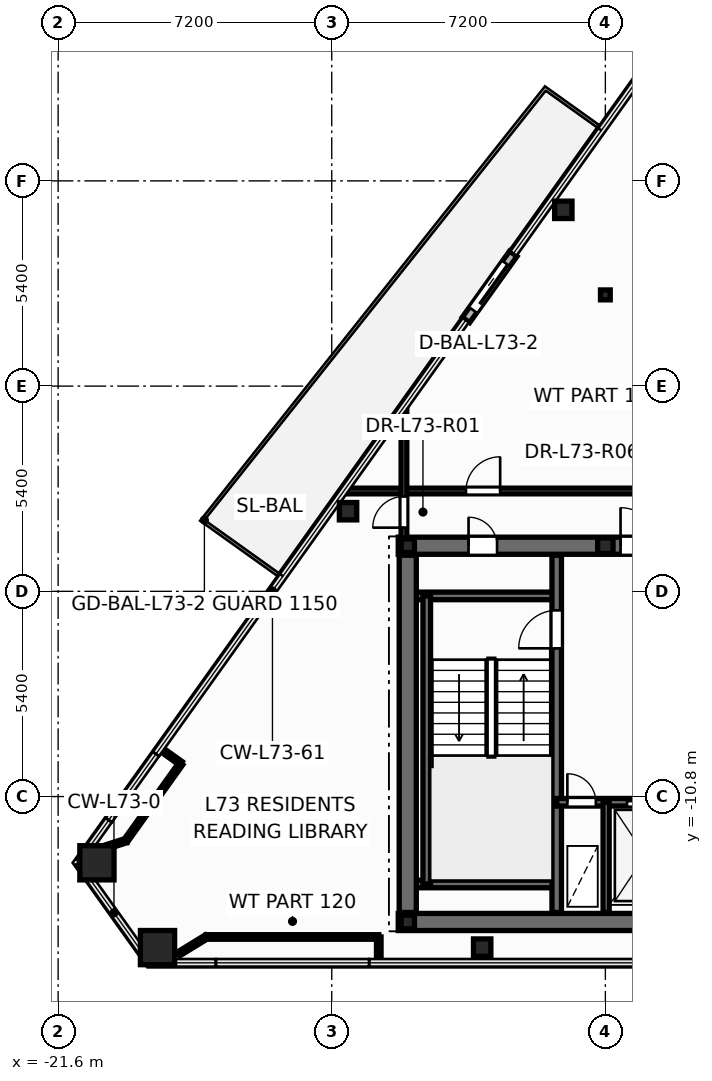
"""IFC4 building model, lengths in metres.
Left out: names, types, materials, properties, quantities, classifications, styles, units other than length and angle.
Written with IfcOpenShell. Run it as: python <this file> out.ifc"""

import sys

from ifc_helpers import new_model, si_unit, direction, frame, frame_2d, origin, origin_2d, place, context, subcontext, project, spatial, rectangle, hollow_rectangle, hollow_circle, i_section, extrude, element, fill, save


model = new_model("IFC4")
c1 = context("Model", 3, precision=1e-05, world=origin(), true_north=direction((0.0, 1.0)))
c2 = subcontext(c1, "Body", "Model", "MODEL_VIEW")
j1 = project(units=[si_unit("LENGTHUNIT", "METRE"), si_unit("PLANEANGLEUNIT", "RADIAN")], contexts=[c1])
p1 = place(None, origin())
s1 = spatial("IfcSite", under=j1, at=p1, CompositionType="ELEMENT")
p2 = place(p1, origin())
s2 = spatial("IfcBuilding", under=s1, at=p2, CompositionType="ELEMENT")
p3 = place(p2, frame((0.0, 0.0, 277.8)))
s3 = spatial("IfcBuildingStorey", under=s2, at=p3, CompositionType="ELEMENT", Elevation=277.8)
for number, where, z_axis, x_axis in (
    (1, (-20.579, -12.543, 0.0), (0.0, 0.0, 1.0), (1.0, 0.0, 0.0)),
    (2, (-18.985, -14.774, 0.0), (0.0, 0.0, 1.0), (1.0, 0.0, 0.0)),
):
    element("IfcColumn", number, at=place(p3, frame(where, z_axis=z_axis, x_axis=x_axis)), inside=s3, PredefinedType="COLUMN", context=c2, shape_type="SweptSolid", body=[
        extrude(hollow_rectangle(XDim=0.9, YDim=0.9, WallThickness=0.04, at=origin_2d()), origin(), (0.0, 0.0, 1.0), 3.6),
    ])
for number, where, z_axis, x_axis in (
    (3, (-10.442, -14.774, 0.0), (0.0, 0.0, 1.0), (1.0, 0.0, 0.0)),
    (4, (-8.306, 4.638, 0.0), (0.0, 0.0, 1.0), (1.0, 0.0, 0.0)),
    (5, (-13.97, -3.292, 0.0), (0.0, 0.0, 1.0), (1.0, 0.0, 0.0)),
):
    element("IfcColumn", number, at=place(p3, frame(where, z_axis=z_axis, x_axis=x_axis)), inside=s3, PredefinedType="COLUMN", context=c2, shape_type="SweptSolid", body=[
        extrude(hollow_circle(Radius=0.229, WallThickness=0.016, at=origin_2d()), origin(), (0.0, 0.0, 1.0), 3.6),
    ])
for number, where, z_axis, x_axis in (
    (6, (-12.4, -14.1, 0.0), (0.0, 0.0, 1.0), (1.0, 0.0, 0.0)),
    (7, (-12.4, -4.2, 0.0), (0.0, 0.0, 1.0), (1.0, 0.0, 0.0)),
):
    element("IfcColumn", number, at=place(p3, frame(where, z_axis=z_axis, x_axis=x_axis)), inside=s3, PredefinedType="COLUMN", context=c2, shape_type="SweptSolid", body=[
        extrude(i_section(OverallWidth=0.352, OverallDepth=0.359, WebThickness=0.018, FlangeThickness=0.026, at=origin_2d()), origin(), (0.0, 0.0, 1.0), 3.6),
    ])
p4 = place(p3, frame((-7.2, -4.2, 0.0), z_axis=(0.0, 0.0, 1.0), x_axis=(1.0, 0.0, 0.0)))
e8 = element("IfcColumn", 8, at=p4, inside=s3, PredefinedType="PILASTER", context=c2, shape_type="SweptSolid", body=[
    extrude(i_section(OverallWidth=0.405, OverallDepth=0.414, WebThickness=0.022, FlangeThickness=0.032, at=origin_2d()), origin(), (0.0, 0.0, 1.0), 3.6),
])
p5 = place(p3, frame((-7.2, 2.4, 0.0), z_axis=(0.0, 0.0, 1.0), x_axis=(1.0, 0.0, 0.0)))
e9 = element("IfcColumn", 9, at=p5, inside=s3, PredefinedType="COLUMN", context=c2, shape_type="SweptSolid", body=[
    extrude(i_section(OverallWidth=0.256, OverallDepth=0.26, WebThickness=0.01, FlangeThickness=0.017, at=origin_2d()), origin(), (0.0, 0.0, 1.0), 3.6),
])
p6 = place(p3, frame((-9.623, 3.482, -0.015), z_axis=(0.0, 0.0, 1.0), x_axis=(-0.581238193719, -0.813733471207, 0.0)))
e10 = element("IfcWall", 10, at=p6, inside=s3, PredefinedType="STANDARD", context=c2, shape_type="SweptSolid", body=[
    extrude(rectangle(XDim=2.14, YDim=0.24, at=frame_2d((1.07, 0.0))), origin(), (0.0, 0.0, 1.0), 2.878),
])
p7 = place(p6, frame((0.32, 0.0, 0.015)))
e11 = element("IfcOpeningElement", 11, at=p7, cuts=e10, PredefinedType="OPENING", context=c2, shape_type="SweptSolid", body=[
    extrude(rectangle(XDim=1.506, YDim=2.204, at=frame_2d((0.75, 1.102))), frame((0.0, 0.13, 0.0), z_axis=(0.0, -1.0, 0.0), x_axis=(1.0, 0.0, 0.0)), (0.0, 0.0, 1.0), 0.26),
])
p8 = place(p3, frame((-12.65, -14.1, 0.0), z_axis=(0.0, 0.0, 1.0), x_axis=(1.0, 0.0, 0.0)))
e12 = element("IfcWall", 12, at=p8, inside=s3, PredefinedType="SHEAR", context=c2, shape_type="SweptSolid", body=[
    extrude(rectangle(XDim=25.3, YDim=0.45, at=frame_2d((12.65, 0.0))), origin(), (0.0, 0.0, 1.0), 3.6),
])
p9 = place(p3, frame((-12.65, -4.2, 0.0), z_axis=(0.0, 0.0, 1.0), x_axis=(1.0, 0.0, 0.0)))
e13 = element("IfcWall", 13, at=p9, inside=s3, PredefinedType="SHEAR", context=c2, shape_type="SweptSolid", body=[
    extrude(rectangle(XDim=25.3, YDim=0.45, at=frame_2d((12.65, 0.0))), origin(), (0.0, 0.0, 1.0), 3.6),
])
p10 = place(p9, frame((1.85, 0.0, 0.0)))
e14 = element("IfcOpeningElement", 14, at=p10, cuts=e13, PredefinedType="OPENING", context=c2, shape_type="SweptSolid", body=[
    extrude(rectangle(XDim=0.756, YDim=2.054, at=frame_2d((0.375, 1.027))), frame((0.0, 0.235, 0.0), z_axis=(0.0, -1.0, 0.0), x_axis=(1.0, 0.0, 0.0)), (0.0, 0.0, 1.0), 0.47),
])
p11 = place(p9, frame((21.85, 0.0, 0.0)))
e15 = element("IfcOpeningElement", 15, at=p11, cuts=e13, PredefinedType="OPENING", context=c2, shape_type="SweptSolid", body=[
    extrude(rectangle(XDim=0.756, YDim=2.054, at=frame_2d((0.375, 1.027))), frame((0.0, 0.235, 0.0), z_axis=(0.0, -1.0, 0.0), x_axis=(1.0, 0.0, 0.0)), (0.0, 0.0, 1.0), 0.47),
])
p12 = place(p9, frame((23.5, 0.0, 0.0)))
e16 = element("IfcOpeningElement", 16, at=p12, cuts=e13, PredefinedType="OPENING", context=c2, shape_type="SweptSolid", body=[
    extrude(rectangle(XDim=0.756, YDim=2.054, at=frame_2d((0.375, 1.027))), frame((0.0, 0.235, 0.0), z_axis=(0.0, -1.0, 0.0), x_axis=(1.0, 0.0, 0.0)), (0.0, 0.0, 1.0), 0.47),
])
p13 = place(p9, frame((5.85, 0.0, 0.0)))
e17 = element("IfcOpeningElement", 17, at=p13, cuts=e13, PredefinedType="OPENING", context=c2, shape_type="SweptSolid", body=[
    extrude(rectangle(XDim=1.006, YDim=2.104, at=frame_2d((0.5, 1.052))), frame((0.0, 0.235, 0.0), z_axis=(0.0, -1.0, 0.0), x_axis=(1.0, 0.0, 0.0)), (0.0, 0.0, 1.0), 0.47),
])
p14 = place(p9, frame((10.35, 0.0, 0.0)))
e18 = element("IfcOpeningElement", 18, at=p14, cuts=e13, PredefinedType="OPENING", context=c2, shape_type="SweptSolid", body=[
    extrude(rectangle(XDim=1.406, YDim=2.154, at=frame_2d((0.7, 1.077))), frame((0.0, 0.235, 0.0), z_axis=(0.0, -1.0, 0.0), x_axis=(1.0, 0.0, 0.0)), (0.0, 0.0, 1.0), 0.47),
])
p15 = place(p9, frame((18.45, 0.0, 0.0)))
e19 = element("IfcOpeningElement", 19, at=p15, cuts=e13, PredefinedType="OPENING", context=c2, shape_type="SweptSolid", body=[
    extrude(rectangle(XDim=1.006, YDim=2.104, at=frame_2d((0.5, 1.052))), frame((0.0, 0.235, 0.0), z_axis=(0.0, -1.0, 0.0), x_axis=(1.0, 0.0, 0.0)), (0.0, 0.0, 1.0), 0.47),
])
for number, where, z_axis, x_axis in (
    (20, (-12.35, -5.52, 0.0), (0.0, 0.0, 1.0), (1.0, 0.0, 0.0)),
    (21, (-12.35, -13.1, 0.0), (0.0, 0.0, 1.0), (1.0, 0.0, 0.0)),
):
    element("IfcWall", number, at=place(p3, frame(where, z_axis=z_axis, x_axis=x_axis)), inside=s3, PredefinedType="SOLIDWALL", context=c2, shape_type="SweptSolid", body=[
        extrude(rectangle(XDim=3.87, YDim=0.2, at=frame_2d((1.935, 0.0))), origin(), (0.0, 0.0, 1.0), 3.6),
    ])
p16 = place(p3, frame((-11.9, -13.1, 0.0), z_axis=(0.0, 0.0, 1.0), x_axis=(0.0, 1.0, 0.0)))
e22 = element("IfcWall", 22, at=p16, inside=s3, PredefinedType="SOLIDWALL", context=c2, shape_type="SweptSolid", body=[
    extrude(rectangle(XDim=7.58, YDim=0.2, at=frame_2d((3.79, 0.0))), origin(), (0.0, 0.0, 1.0), 3.6),
])
p17 = place(p3, frame((-8.48, -13.85, 0.0), z_axis=(0.0, 0.0, 1.0), x_axis=(0.0, 1.0, 0.0)))
e23 = element("IfcWall", 23, at=p17, inside=s3, PredefinedType="SHEAR", context=c2, shape_type="SweptSolid", body=[
    extrude(rectangle(XDim=9.4, YDim=0.25, at=frame_2d((4.7, 0.0))), origin(), (0.0, 0.0, 1.0), 3.6),
])
p18 = place(p17, frame((6.95, 0.0, 0.0)))
e24 = element("IfcOpeningElement", 24, at=p18, cuts=e23, PredefinedType="OPENING", context=c2, shape_type="SweptSolid", body=[
    extrude(rectangle(XDim=1.006, YDim=2.104, at=frame_2d((0.5, 1.052))), frame((0.0, 0.135, 0.0), z_axis=(0.0, -1.0, 0.0), x_axis=(1.0, 0.0, 0.0)), (0.0, 0.0, 1.0), 0.27),
])
p19 = place(p3, frame((-8.48, -10.95, 0.0), z_axis=(0.0, 0.0, 1.0), x_axis=(1.0, 0.0, 0.0)))
e25 = element("IfcWall", 25, at=p19, inside=s3, PredefinedType="SOLIDWALL", context=c2, shape_type="SweptSolid", body=[
    extrude(rectangle(XDim=3.36, YDim=0.2, at=frame_2d((1.68, 0.0))), origin(), (0.0, 0.0, 1.0), 3.6),
])
p20 = place(p19, frame((0.28, 0.0, 0.0)))
e26 = element("IfcOpeningElement", 26, at=p20, cuts=e25, PredefinedType="OPENING", context=c2, shape_type="SweptSolid", body=[
    extrude(rectangle(XDim=0.756, YDim=2.054, at=frame_2d((0.375, 1.027))), frame((0.0, 0.11, 0.0), z_axis=(0.0, -1.0, 0.0), x_axis=(1.0, 0.0, 0.0)), (0.0, 0.0, 1.0), 0.22),
])
p21 = place(p19, frame((1.85, 0.0, 0.0)))
e27 = element("IfcOpeningElement", 27, at=p21, cuts=e25, PredefinedType="OPENING", context=c2, shape_type="SweptSolid", body=[
    extrude(rectangle(XDim=1.106, YDim=2.104, at=frame_2d((0.55, 1.052))), frame((0.0, 0.11, 0.0), z_axis=(0.0, -1.0, 0.0), x_axis=(1.0, 0.0, 0.0)), (0.0, 0.0, 1.0), 0.22),
])
p22 = place(p3, frame((-7.18, -13.85, 0.0), z_axis=(0.0, 0.0, 1.0), x_axis=(0.0, 1.0, 0.0)))
e28 = element("IfcWall", 28, at=p22, inside=s3, PredefinedType="PARTITIONING", context=c2, shape_type="SweptSolid", body=[
    extrude(rectangle(XDim=2.9, YDim=0.16, at=frame_2d((1.45, 0.0))), origin(), (0.0, 0.0, 1.0), 2.57),
])
p23 = place(p3, frame((-12.4, -13.85, 0.0), z_axis=(0.0, 0.0, 1.0), x_axis=(0.0, 1.0, 0.0)))
e29 = element("IfcWall", 29, at=p23, inside=s3, PredefinedType="SHEAR", context=c2, shape_type="SweptSolid", body=[
    extrude(rectangle(XDim=9.4, YDim=0.45, at=frame_2d((4.7, 0.0))), origin(), (0.0, 0.0, 1.0), 3.6),
])
p24 = place(p3, frame((-14.082, -2.76, 0.0), z_axis=(0.0, 0.0, 1.0), x_axis=(1.0, 0.0, 0.0)))
e30 = element("IfcWall", 30, at=p24, inside=s3, PredefinedType="PARTITIONING", context=c2, shape_type="SweptSolid", body=[
    extrude(rectangle(XDim=10.042, YDim=0.15, at=frame_2d((5.021, 0.0))), origin(), (0.0, 0.0, 1.0), 2.32),
])
p25 = place(p24, frame((3.214, 0.0, 0.0)))
e31 = element("IfcOpeningElement", 31, at=p25, cuts=e30, PredefinedType="OPENING", context=c2, shape_type="SweptSolid", body=[
    extrude(rectangle(XDim=0.906, YDim=2.104, at=frame_2d((0.45, 1.052))), frame((0.0, 0.085, 0.0), z_axis=(0.0, -1.0, 0.0), x_axis=(1.0, 0.0, 0.0)), (0.0, 0.0, 1.0), 0.17),
])
p26 = place(p3, frame((-17.701, -14.494, 0.0), z_axis=(0.0, 0.0, 1.0), x_axis=(1.0, 0.0, 0.0)))
e32 = element("IfcWall", 32, at=p26, inside=s3, PredefinedType="PARTITIONING", context=c2, shape_type="SweptSolid", body=[
    extrude(rectangle(XDim=4.539, YDim=0.12, at=frame_2d((2.27, 0.0))), origin(), (0.0, 0.0, 1.0), 3.345),
])
p27 = place(p3, frame((-12.5, -4.24, 0.0), z_axis=(0.0, 0.0, 1.0), x_axis=(0.0, 1.0, 0.0)))
e33 = element("IfcWall", 33, at=p27, inside=s3, PredefinedType="PARTITIONING", context=c2, shape_type="SweptSolid", body=[
    extrude(rectangle(XDim=3.695, YDim=0.15, at=frame_2d((1.848, 0.0))), origin(), (0.0, 0.0, 1.0), 2.32),
])
p28 = place(p27, frame((0.516, 0.0, 0.0)))
e34 = element("IfcOpeningElement", 34, at=p28, cuts=e33, PredefinedType="OPENING", context=c2, shape_type="SweptSolid", body=[
    extrude(rectangle(XDim=0.826, YDim=2.104, at=frame_2d((0.41, 1.052))), frame((0.0, 0.085, 0.0), z_axis=(0.0, -1.0, 0.0), x_axis=(1.0, 0.0, 0.0)), (0.0, 0.0, 1.0), 0.17),
])
p29 = place(p3, frame((-18.368, -9.929, 0.0), z_axis=(0.0, 0.0, 1.0), x_axis=(-0.581293660329, -0.813693849344, 0.0)))
e35 = element("IfcWall", 35, at=p29, inside=s3, PredefinedType="PARTITIONING", context=c2, shape_type="SweptSolid", body=[
    extrude(rectangle(XDim=2.498, YDim=0.12, at=frame_2d((1.249, 0.0))), origin(), (0.0, 0.0, 1.0), 2.32),
])
p30 = place(p3, frame((-18.432, -14.941, 0.0), z_axis=(0.0, 0.0, 1.0), x_axis=(0.853211335825, 0.521565352013, 0.0)))
e36 = element("IfcWall", 36, at=p30, inside=s3, PredefinedType="PARTITIONING", context=c2, shape_type="SweptSolid", body=[
    extrude(rectangle(XDim=0.856, YDim=0.12, at=frame_2d((0.428, 0.0))), origin(), (0.0, 0.0, 1.0), 2.863),
])
p31 = place(p3, frame((-19.82, -11.962, 0.0), z_axis=(0.0, 0.0, 1.0), x_axis=(-0.952390933617, -0.304879500071, 0.0)))
e37 = element("IfcWall", 37, at=p31, inside=s3, PredefinedType="PARTITIONING", context=c2, shape_type="SweptSolid", body=[
    extrude(rectangle(XDim=0.854, YDim=0.12, at=frame_2d((0.427, 0.0))), origin(), (0.0, 0.0, 1.0), 2.32),
])
for number, where, z_axis, x_axis in (
    (38, (-13.162, -14.494, 0.0), (0.0, 0.0, 1.0), (0.0, -1.0, 0.0)),
    (39, (-18.913, -9.54, 0.0), (0.0, 0.0, 1.0), (0.814, -0.581, 0.0)),
):
    element("IfcWall", number, at=place(p3, frame(where, z_axis=z_axis, x_axis=x_axis)), inside=s3, PredefinedType="PARTITIONING", context=c2, shape_type="SweptSolid", body=[
        extrude(rectangle(XDim=0.67, YDim=0.12, at=frame_2d((0.335, 0.0))), origin(), (0.0, 0.0, 1.0), 2.863),
    ])
p32 = place(p7, origin())
e40 = element("IfcDoor", 40, at=p32, inside=s3, OperationType="SLIDING_TO_RIGHT", PredefinedType="DOOR", context=c2, shape_type="SweptSolid", body=[
    extrude(rectangle(XDim=1.5, YDim=2.2, at=frame_2d((0.75, 1.1))), frame((0.0, 0.025, 0.0), z_axis=(0.0, -1.0, 0.0), x_axis=(1.0, 0.0, 0.0)), (0.0, 0.0, 1.0), 0.05),
])
fill(e11, e40)
p33 = place(p18, origin())
e41 = element("IfcDoor", 41, at=p33, inside=s3, OperationType="SINGLE_SWING_LEFT", PredefinedType="DOOR", context=c2, shape_type="SweptSolid", body=[
    extrude(rectangle(XDim=1.0, YDim=2.1, at=frame_2d((0.5, 1.05))), frame((0.0, 0.025, 0.0), z_axis=(0.0, -1.0, 0.0), x_axis=(1.0, 0.0, 0.0)), (0.0, 0.0, 1.0), 0.05),
])
fill(e24, e41)
p34 = place(p20, origin())
e42 = element("IfcDoor", 42, at=p34, inside=s3, OperationType="SINGLE_SWING_LEFT", PredefinedType="DOOR", context=c2, shape_type="SweptSolid", body=[
    extrude(rectangle(XDim=0.75, YDim=2.05, at=frame_2d((0.375, 1.025))), frame((0.0, 0.025, 0.0), z_axis=(0.0, -1.0, 0.0), x_axis=(1.0, 0.0, 0.0)), (0.0, 0.0, 1.0), 0.05),
])
fill(e26, e42)
p35 = place(p21, origin())
e43 = element("IfcDoor", 43, at=p35, inside=s3, OperationType="DOUBLE_DOOR_SLIDING", PredefinedType="DOOR", context=c2, shape_type="SweptSolid", body=[
    extrude(rectangle(XDim=1.1, YDim=2.1, at=frame_2d((0.55, 1.05))), frame((0.0, 0.025, 0.0), z_axis=(0.0, -1.0, 0.0), x_axis=(1.0, 0.0, 0.0)), (0.0, 0.0, 1.0), 0.05),
])
fill(e27, e43)
p36 = place(p10, origin())
e44 = element("IfcDoor", 44, at=p36, inside=s3, OperationType="SINGLE_SWING_LEFT", PredefinedType="DOOR", context=c2, shape_type="SweptSolid", body=[
    extrude(rectangle(XDim=0.75, YDim=2.05, at=frame_2d((0.375, 1.025))), frame((0.0, 0.025, 0.0), z_axis=(0.0, -1.0, 0.0), x_axis=(1.0, 0.0, 0.0)), (0.0, 0.0, 1.0), 0.05),
])
fill(e14, e44)
p37 = place(p13, origin())
e45 = element("IfcDoor", 45, at=p37, inside=s3, OperationType="SINGLE_SWING_LEFT", PredefinedType="DOOR", context=c2, shape_type="SweptSolid", body=[
    extrude(rectangle(XDim=1.0, YDim=2.1, at=frame_2d((0.5, 1.05))), frame((0.0, 0.025, 0.0), z_axis=(0.0, -1.0, 0.0), x_axis=(1.0, 0.0, 0.0)), (0.0, 0.0, 1.0), 0.05),
])
fill(e17, e45)
p38 = place(p28, origin())
e46 = element("IfcDoor", 46, at=p38, inside=s3, OperationType="SINGLE_SWING_LEFT", PredefinedType="DOOR", context=c2, shape_type="SweptSolid", body=[
    extrude(rectangle(XDim=0.82, YDim=2.1, at=frame_2d((0.41, 1.05))), frame((0.0, 0.025, 0.0), z_axis=(0.0, -1.0, 0.0), x_axis=(1.0, 0.0, 0.0)), (0.0, 0.0, 1.0), 0.05),
])
fill(e34, e46)
p39 = place(p25, origin())
e47 = element("IfcDoor", 47, at=p39, inside=s3, OperationType="SINGLE_SWING_RIGHT", PredefinedType="DOOR", context=c2, shape_type="SweptSolid", body=[
    extrude(rectangle(XDim=0.9, YDim=2.1, at=frame_2d((0.45, 1.05))), frame((0.0, 0.025, 0.0), z_axis=(0.0, -1.0, 0.0), x_axis=(1.0, 0.0, 0.0)), (0.0, 0.0, 1.0), 0.05),
])
fill(e31, e47)
save(model, sys.argv[1])
